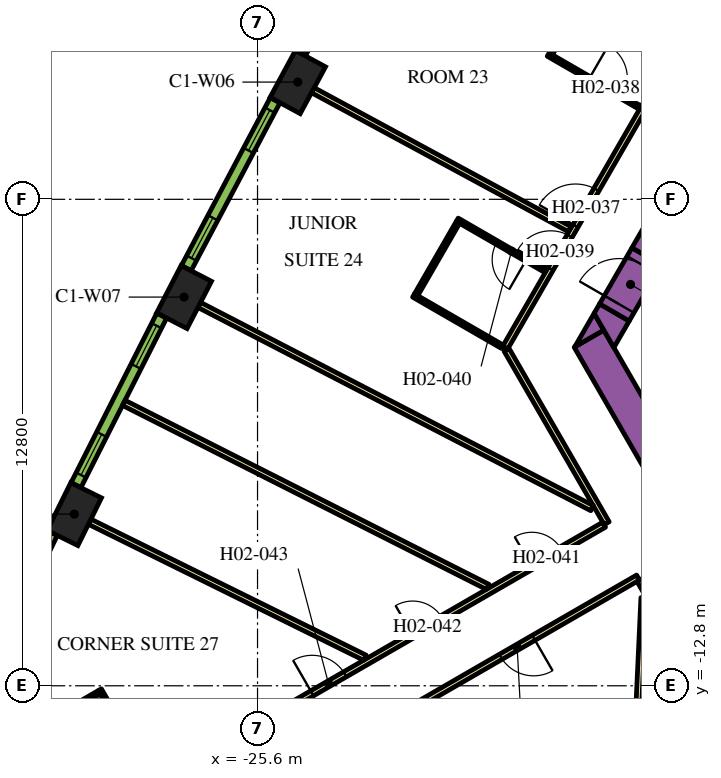
"""IFC4 building model, lengths in metres.
Left out: names, types, materials, properties, quantities, classifications, styles, units other than length and angle.
Written with IfcOpenShell. Run it as: python <this file> out.ifc"""

import sys

from ifc_helpers import new_model, si_unit, direction, frame, frame_2d, origin, origin_2d, place, context, subcontext, project, spatial, polyline, rectangle, outline, extrude, element, fill, save


model = new_model("IFC4")
c1 = context("Model", 3, precision=1e-05, world=origin(), true_north=direction((0.0, 1.0)))
c2 = subcontext(c1, "Body", "Model", "MODEL_VIEW")
j1 = project(units=[si_unit("LENGTHUNIT", "METRE"), si_unit("PLANEANGLEUNIT", "RADIAN")], contexts=[c1])
p1 = place(None, origin())
s1 = spatial("IfcSite", under=j1, at=p1, CompositionType="ELEMENT")
p2 = place(p1, origin())
s2 = spatial("IfcBuilding", under=s1, at=p2, CompositionType="ELEMENT")
p3 = place(p2, frame((0.0, 0.0, 39.3)))
s3 = spatial("IfcBuildingStorey", under=s2, at=p3, CompositionType="ELEMENT", Elevation=39.3)
for number, where, z_axis, x_axis in (
    (1, (-24.54, 3.085, 0.0), (0.0, 0.0, 1.0), (-0.476, -0.88, 0.0)),
    (2, (-27.533, -2.572, 0.0), (0.0, 0.0, 1.0), (-0.459, -0.888, 0.0)),
    (3, (-30.421, -8.284, 0.0), (0.0, 0.0, 1.0), (-0.443, -0.897, 0.0)),
):
    element("IfcColumn", number, at=place(p3, frame(where, z_axis=z_axis, x_axis=x_axis)), inside=s3, PredefinedType="COLUMN", context=c2, shape_type="SweptSolid", body=[
        extrude(rectangle(XDim=1.4, YDim=0.9, at=origin_2d()), origin(), (0.0, 0.0, 1.0), 3.9),
    ])
p4 = place(p3, frame((-15.36, -1.503, 0.0), z_axis=(0.0, 0.0, 1.0), x_axis=(0.50000389221, 0.866023156604, 0.0)))
e4 = element("IfcWall", 4, at=p4, inside=s3, PredefinedType="SOLIDWALL", context=c2, shape_type="SweptSolid", body=[
    extrude(rectangle(XDim=21.0, YDim=0.9, at=frame_2d((10.5, 0.0))), origin(), (0.0, 0.0, 1.0), 3.9),
])
p5 = place(p3, frame((-12.134, -11.883, 0.0), z_axis=(0.0, 0.0, 1.0), x_axis=(-0.500005339912, 0.866022320763, 0.0)))
e5 = element("IfcWall", 5, at=p5, inside=s3, PredefinedType="SOLIDWALL", context=c2, shape_type="SweptSolid", body=[
    extrude(rectangle(XDim=9.488, YDim=0.9, at=frame_2d((4.744, 0.0))), origin(), (0.0, 0.0, 1.0), 3.9),
])
p6 = place(p3, origin())
e6 = element("IfcWall", 6, at=p6, inside=s3, PredefinedType="SOLIDWALL", context=c2, shape_type="SweptSolid", body=[
    extrude(outline(polyline([(-16.489, -3.44), (-17.251, -3.88), (-16.743, -3.0), (-16.489, -3.44)])), origin(), (0.0, 0.0, 1.0), 3.9),
])
e7 = element("IfcWall", 7, at=p6, inside=s3, PredefinedType="SOLIDWALL", context=c2, shape_type="SweptSolid", body=[
    extrude(outline(polyline([(-15.82, -3.201), (-16.223, -3.9), (-16.743, -3.0), (-16.599, -2.751), (-15.82, -3.201)])), origin(), (0.0, 0.0, 1.0), 3.9),
])
p7 = place(p3, frame((-16.209, -2.976, 0.0), z_axis=(0.0, 0.0, 1.0), x_axis=(0.499954529098, 0.86605165483, 0.0)))
e8 = element("IfcWall", 8, at=p7, inside=s3, PredefinedType="SOLIDWALL", context=c2, shape_type="SweptSolid", body=[
    extrude(rectangle(XDim=1.7, YDim=0.9, at=frame_2d((0.85, 0.0))), origin(), (0.0, 0.0, 1.0), 3.9),
])
p8 = place(p7, frame((0.25, 0.0, 0.0)))
e9 = element("IfcOpeningElement", 9, at=p8, cuts=e8, PredefinedType="OPENING", context=c2, shape_type="SweptSolid", body=[
    extrude(rectangle(XDim=1.2, YDim=2.1, at=frame_2d((0.6, 1.05))), frame((0.0, 0.46, 0.0), z_axis=(0.0, -1.0, 0.0), x_axis=(1.0, 0.0, 0.0)), (0.0, 0.0, 1.0), 0.92),
])
p9 = place(p3, frame((-19.081, -3.9, 0.0), z_axis=(0.0, 0.0, 1.0), x_axis=(0.499998313975, 0.866026377209, 0.0)))
e10 = element("IfcWall", 10, at=p9, inside=s3, PredefinedType="PARTITIONING", context=c2, shape_type="SweptSolid", body=[
    extrude(rectangle(XDim=25.766, YDim=0.15, at=frame_2d((12.883, 0.0))), origin(), (0.0, 0.0, 1.0), 2.75),
])
p10 = place(p9, frame((16.196, 0.0, 0.0)))
e11 = element("IfcOpeningElement", 11, at=p10, cuts=e10, PredefinedType="OPENING", context=c2, shape_type="SweptSolid", body=[
    extrude(rectangle(XDim=1.0, YDim=2.1, at=frame_2d((0.5, 1.05))), frame((0.0, 0.085, 0.0), z_axis=(0.0, -1.0, 0.0), x_axis=(1.0, 0.0, 0.0)), (0.0, 0.0, 1.0), 0.17),
])
p11 = place(p9, frame((14.889, 0.0, 0.0)))
e12 = element("IfcOpeningElement", 12, at=p11, cuts=e10, PredefinedType="OPENING", context=c2, shape_type="SweptSolid", body=[
    extrude(rectangle(XDim=1.0, YDim=2.1, at=frame_2d((0.5, 1.05))), frame((0.0, 0.085, 0.0), z_axis=(0.0, -1.0, 0.0), x_axis=(1.0, 0.0, 0.0)), (0.0, 0.0, 1.0), 0.17),
])
p12 = place(p9, frame((3.698, 0.0, 0.0)))
e13 = element("IfcOpeningElement", 13, at=p12, cuts=e10, PredefinedType="OPENING", context=c2, shape_type="SweptSolid", body=[
    extrude(rectangle(XDim=1.1, YDim=2.1, at=frame_2d((0.55, 1.05))), frame((0.0, 0.085, 0.0), z_axis=(0.0, -1.0, 0.0), x_axis=(1.0, 0.0, 0.0)), (0.0, 0.0, 1.0), 0.17),
])
p13 = place(p9, frame((2.392, 0.0, 0.0)))
e14 = element("IfcOpeningElement", 14, at=p13, cuts=e10, PredefinedType="OPENING", context=c2, shape_type="SweptSolid", body=[
    extrude(rectangle(XDim=1.0, YDim=2.1, at=frame_2d((0.5, 1.05))), frame((0.0, 0.085, 0.0), z_axis=(0.0, -1.0, 0.0), x_axis=(1.0, 0.0, 0.0)), (0.0, 0.0, 1.0), 0.17),
])
p14 = place(p3, frame((-16.412, -8.523, 0.0), z_axis=(0.0, 0.0, 1.0), x_axis=(-0.500001929737, 0.866024289647, 0.0)))
e15 = element("IfcWall", 15, at=p14, inside=s3, PredefinedType="PARTITIONING", context=c2, shape_type="SweptSolid", body=[
    extrude(rectangle(XDim=5.268, YDim=0.15, at=frame_2d((2.634, 0.0))), origin(), (0.0, 0.0, 1.0), 2.75),
])
p15 = place(p3, frame((-30.463, -16.635, 0.0), z_axis=(0.0, 0.0, 1.0), x_axis=(0.866022394896, 0.500005211512, 0.0)))
e16 = element("IfcWall", 16, at=p15, inside=s3, PredefinedType="PARTITIONING", context=c2, shape_type="SweptSolid", body=[
    extrude(rectangle(XDim=16.144, YDim=0.15, at=frame_2d((8.072, 0.0))), origin(), (0.0, 0.0, 1.0), 2.75),
])
p16 = place(p15, frame((13.948, 0.0, 0.0)))
e17 = element("IfcOpeningElement", 17, at=p16, cuts=e16, PredefinedType="OPENING", context=c2, shape_type="SweptSolid", body=[
    extrude(rectangle(XDim=0.9, YDim=2.1, at=frame_2d((0.45, 1.05))), frame((0.0, 0.085, 0.0), z_axis=(0.0, -1.0, 0.0), x_axis=(1.0, 0.0, 0.0)), (0.0, 0.0, 1.0), 0.17),
])
p17 = place(p15, frame((10.329, 0.0, 0.0)))
e18 = element("IfcOpeningElement", 18, at=p17, cuts=e16, PredefinedType="OPENING", context=c2, shape_type="SweptSolid", body=[
    extrude(rectangle(XDim=0.9, YDim=2.1, at=frame_2d((0.45, 1.05))), frame((0.0, 0.085, 0.0), z_axis=(0.0, -1.0, 0.0), x_axis=(1.0, 0.0, 0.0)), (0.0, 0.0, 1.0), 0.17),
])
p18 = place(p15, frame((7.274, 0.0, 0.0)))
e19 = element("IfcOpeningElement", 19, at=p18, cuts=e16, PredefinedType="OPENING", context=c2, shape_type="SweptSolid", body=[
    extrude(rectangle(XDim=1.0, YDim=2.1, at=frame_2d((0.5, 1.05))), frame((0.0, 0.085, 0.0), z_axis=(0.0, -1.0, 0.0), x_axis=(1.0, 0.0, 0.0)), (0.0, 0.0, 1.0), 0.17),
])
p19 = place(p3, frame((-15.587, -9.952, 0.0), z_axis=(0.0, 0.0, 1.0), x_axis=(-0.866022197818, -0.500005552856, 0.0)))
e20 = element("IfcWall", 20, at=p19, inside=s3, PredefinedType="PARTITIONING", context=c2, shape_type="SweptSolid", body=[
    extrude(rectangle(XDim=16.224, YDim=0.15, at=frame_2d((8.112, 0.0))), origin(), (0.0, 0.0, 1.0), 2.75),
])
p20 = place(p19, frame((7.949, 0.0, 0.0)))
e21 = element("IfcOpeningElement", 21, at=p20, cuts=e20, PredefinedType="OPENING", context=c2, shape_type="SweptSolid", body=[
    extrude(rectangle(XDim=1.0, YDim=2.1, at=frame_2d((0.5, 1.05))), frame((0.0, 0.085, 0.0), z_axis=(0.0, -1.0, 0.0), x_axis=(1.0, 0.0, 0.0)), (0.0, 0.0, 1.0), 0.17),
])
p21 = place(p19, frame((3.172, 0.0, 0.0)))
e22 = element("IfcOpeningElement", 22, at=p21, cuts=e20, PredefinedType="OPENING", context=c2, shape_type="SweptSolid", body=[
    extrude(rectangle(XDim=1.0, YDim=2.1, at=frame_2d((0.5, 1.05))), frame((0.0, 0.085, 0.0), z_axis=(0.0, -1.0, 0.0), x_axis=(1.0, 0.0, 0.0)), (0.0, 0.0, 1.0), 0.17),
])
p22 = place(p3, frame((-12.918, -14.575, 0.0), z_axis=(0.0, 0.0, 1.0), x_axis=(-0.500009150678, 0.866020120573, 0.0)))
e23 = element("IfcWall", 23, at=p22, inside=s3, PredefinedType="PARTITIONING", context=c2, shape_type="SweptSolid", body=[
    extrude(rectangle(XDim=5.258, YDim=0.15, at=frame_2d((2.629, 0.0))), origin(), (0.0, 0.0, 1.0), 2.75),
])
p23 = place(p22, frame((1.888, 0.0, 0.0)))
e24 = element("IfcOpeningElement", 24, at=p23, cuts=e23, PredefinedType="OPENING", context=c2, shape_type="SweptSolid", body=[
    extrude(rectangle(XDim=1.0, YDim=2.1, at=frame_2d((0.5, 1.05))), frame((0.0, 0.085, 0.0), z_axis=(0.0, -1.0, 0.0), x_axis=(1.0, 0.0, 0.0)), (0.0, 0.0, 1.0), 0.17),
])
p24 = place(p3, frame((-30.018, -8.483, 0.0), z_axis=(0.0, 0.0, 1.0), x_axis=(0.896544505264, -0.44295366584, 0.0)))
e25 = element("IfcWall", 25, at=p24, inside=s3, PredefinedType="PARTITIONING", context=c2, shape_type="SweptSolid", body=[
    extrude(rectangle(XDim=8.079, YDim=0.15, at=frame_2d((4.04, 0.0))), origin(), (0.0, 0.0, 1.0), 2.75),
])
p25 = place(p3, frame((-29.12, -5.356, 0.0), z_axis=(0.0, 0.0, 1.0), x_axis=(0.892401965553, -0.451241323327, 0.0)))
e26 = element("IfcWall", 26, at=p25, inside=s3, PredefinedType="PARTITIONING", context=c2, shape_type="SweptSolid", body=[
    extrude(rectangle(XDim=10.729, YDim=0.15, at=frame_2d((5.364, 0.0))), origin(), (0.0, 0.0, 1.0), 2.75),
])
p26 = place(p3, frame((-24.145, 2.871, 0.0), z_axis=(0.0, 0.0, 1.0), x_axis=(0.879551725039, -0.475803281809, 0.0)))
e27 = element("IfcWall", 27, at=p26, inside=s3, PredefinedType="PARTITIONING", context=c2, shape_type="SweptSolid", body=[
    extrude(rectangle(XDim=7.688, YDim=0.15, at=frame_2d((3.844, 0.0))), origin(), (0.0, 0.0, 1.0), 2.75),
])
p27 = place(p3, frame((-27.134, -2.779, 0.0), z_axis=(0.0, 0.0, 1.0), x_axis=(0.8882049501, -0.459447457951, 0.0)))
e28 = element("IfcWall", 28, at=p27, inside=s3, PredefinedType="PARTITIONING", context=c2, shape_type="SweptSolid", body=[
    extrude(rectangle(XDim=11.638, YDim=0.15, at=frame_2d((5.819, 0.0))), origin(), (0.0, 0.0, 1.0), 2.75),
])
p28 = place(p3, frame((-15.973, -22.109, 0.0), z_axis=(0.0, 0.0, 1.0), x_axis=(0.046191717129, 0.998932592955, 0.0)))
e29 = element("IfcWall", 29, at=p28, inside=s3, PredefinedType="PARTITIONING", context=c2, shape_type="SweptSolid", body=[
    extrude(rectangle(XDim=11.638, YDim=0.15, at=frame_2d((5.819, 0.0))), origin(), (0.0, 0.0, 1.0), 2.75),
])
p29 = place(p3, frame((-17.951, 3.808, 0.0), z_axis=(0.0, 0.0, 1.0), x_axis=(0.866034573852, -0.49998411664, 0.0)))
e30 = element("IfcWall", 30, at=p29, inside=s3, PredefinedType="PARTITIONING", context=c2, shape_type="SweptSolid", body=[
    extrude(rectangle(XDim=2.8, YDim=0.1, at=frame_2d((1.4, 0.0))), origin(), (0.0, 0.0, 1.0), 2.75),
])
p30 = place(p29, frame((1.25, 0.0, 0.0)))
e31 = element("IfcOpeningElement", 31, at=p30, cuts=e30, PredefinedType="OPENING", context=c2, shape_type="SweptSolid", body=[
    extrude(rectangle(XDim=1.0, YDim=2.1, at=frame_2d((0.5, 1.05))), frame((0.0, 0.06, 0.0), z_axis=(0.0, -1.0, 0.0), x_axis=(1.0, 0.0, 0.0)), (0.0, 0.0, 1.0), 0.12),
])
p31 = place(p3, frame((-17.878, 3.835, 0.0), z_axis=(0.0, 0.0, 1.0), x_axis=(0.500061428766, 0.865989934965, 0.0)))
e32 = element("IfcWall", 32, at=p31, inside=s3, PredefinedType="PARTITIONING", context=c2, shape_type="SweptSolid", body=[
    extrude(rectangle(XDim=2.39, YDim=0.1, at=frame_2d((1.195, 0.0))), origin(), (0.0, 0.0, 1.0), 2.75),
])
p32 = place(p3, frame((-18.006, -1.888, 0.0), z_axis=(0.0, 0.0, 1.0), x_axis=(-0.866036505625, 0.499980770555, 0.0)))
e33 = element("IfcWall", 33, at=p32, inside=s3, PredefinedType="PARTITIONING", context=c2, shape_type="SweptSolid", body=[
    extrude(rectangle(XDim=2.7, YDim=0.1, at=frame_2d((1.35, 0.0))), origin(), (0.0, 0.0, 1.0), 2.75),
])
p33 = place(p32, frame((0.6, 0.0, 0.0)))
e34 = element("IfcOpeningElement", 34, at=p33, cuts=e33, PredefinedType="OPENING", context=c2, shape_type="SweptSolid", body=[
    extrude(rectangle(XDim=0.9, YDim=2.1, at=frame_2d((0.45, 1.05))), frame((0.0, 0.06, 0.0), z_axis=(0.0, -1.0, 0.0), x_axis=(1.0, 0.0, 0.0)), (0.0, 0.0, 1.0), 0.12),
])
p34 = place(p3, frame((-20.326, -0.606, 0.0), z_axis=(0.0, 0.0, 1.0), x_axis=(-0.499946605688, -0.86605622881, 0.0)))
e35 = element("IfcWall", 35, at=p34, inside=s3, PredefinedType="PARTITIONING", context=c2, shape_type="SweptSolid", body=[
    extrude(rectangle(XDim=2.2, YDim=0.1, at=frame_2d((1.1, 0.0))), origin(), (0.0, 0.0, 1.0), 2.75),
])
p35 = place(p3, frame((-19.156, -3.88, 0.0), z_axis=(0.0, 0.0, 1.0), x_axis=(-0.86599734893, 0.500048589285, 0.0)))
e36 = element("IfcWall", 36, at=p35, inside=s3, PredefinedType="PARTITIONING", context=c2, shape_type="SweptSolid", body=[
    extrude(rectangle(XDim=2.7, YDim=0.1, at=frame_2d((1.35, 0.0))), origin(), (0.0, 0.0, 1.0), 2.75),
])
p36 = place(p3, frame((-28.352, -15.33, 0.0), z_axis=(0.0, 0.0, 1.0), x_axis=(-0.500049511043, 0.865996816683, 0.0)))
e37 = element("IfcWall", 37, at=p36, inside=s3, PredefinedType="PARTITIONING", context=c2, shape_type="SweptSolid", body=[
    extrude(rectangle(XDim=2.8, YDim=0.1, at=frame_2d((1.4, 0.0))), origin(), (0.0, 0.0, 1.0), 2.75),
])
p37 = place(p36, frame((0.6, 0.0, 0.0)))
e38 = element("IfcOpeningElement", 38, at=p37, cuts=e37, PredefinedType="OPENING", context=c2, shape_type="SweptSolid", body=[
    extrude(rectangle(XDim=0.9, YDim=2.1, at=frame_2d((0.45, 1.05))), frame((0.0, 0.06, 0.0), z_axis=(0.0, -1.0, 0.0), x_axis=(1.0, 0.0, 0.0)), (0.0, 0.0, 1.0), 0.12),
])
p38 = place(p3, frame((-29.771, -12.973, 0.0), z_axis=(0.0, 0.0, 1.0), x_axis=(-0.865980596518, -0.500077600433, 0.0)))
e39 = element("IfcWall", 39, at=p38, inside=s3, PredefinedType="PARTITIONING", context=c2, shape_type="SweptSolid", body=[
    extrude(rectangle(XDim=2.4, YDim=0.1, at=frame_2d((1.2, 0.0))), origin(), (0.0, 0.0, 1.0), 2.75),
])
p39 = place(p3, frame((-22.05, 8.22, 0.0), z_axis=(0.0, 0.0, 1.0), x_axis=(-0.483912572871, -0.875116347589, 0.0)))
e40 = element("IfcWall", 40, at=p39, inside=s3, PredefinedType="SOLIDWALL", context=c2, shape_type="SweptSolid", body=[
    extrude(rectangle(XDim=4.998, YDim=0.29, at=frame_2d((2.499, 0.0))), origin(), (0.0, 0.0, 1.0), 3.65),
])
p40 = place(p39, frame((0.297, 0.0, 0.9)))
e41 = element("IfcOpeningElement", 41, at=p40, cuts=e40, PredefinedType="OPENING", context=c2, shape_type="SweptSolid", body=[
    extrude(rectangle(XDim=1.2, YDim=2.15, at=frame_2d((0.6, 1.075))), frame((0.0, 0.155, 0.0), z_axis=(0.0, -1.0, 0.0), x_axis=(1.0, 0.0, 0.0)), (0.0, 0.0, 1.0), 0.31),
])
p41 = place(p39, frame((3.501, 0.0, 0.9)))
e42 = element("IfcOpeningElement", 42, at=p41, cuts=e40, PredefinedType="OPENING", context=c2, shape_type="SweptSolid", body=[
    extrude(rectangle(XDim=1.2, YDim=2.15, at=frame_2d((0.6, 1.075))), frame((0.0, 0.155, 0.0), z_axis=(0.0, -1.0, 0.0), x_axis=(1.0, 0.0, 0.0)), (0.0, 0.0, 1.0), 0.31),
])
p42 = place(p3, frame((-25.138, 2.608, 0.0), z_axis=(0.0, 0.0, 1.0), x_axis=(-0.467629620899, -0.883924509026, 0.0)))
e43 = element("IfcWall", 43, at=p42, inside=s3, PredefinedType="SOLIDWALL", context=c2, shape_type="SweptSolid", body=[
    extrude(rectangle(XDim=4.998, YDim=0.29, at=frame_2d((2.499, 0.0))), origin(), (0.0, 0.0, 1.0), 3.65),
])
p43 = place(p42, frame((0.297, 0.0, 0.9)))
e44 = element("IfcOpeningElement", 44, at=p43, cuts=e43, PredefinedType="OPENING", context=c2, shape_type="SweptSolid", body=[
    extrude(rectangle(XDim=1.2, YDim=2.15, at=frame_2d((0.6, 1.075))), frame((0.0, 0.155, 0.0), z_axis=(0.0, -1.0, 0.0), x_axis=(1.0, 0.0, 0.0)), (0.0, 0.0, 1.0), 0.31),
])
p44 = place(p42, frame((3.501, 0.0, 0.9)))
e45 = element("IfcOpeningElement", 45, at=p44, cuts=e43, PredefinedType="OPENING", context=c2, shape_type="SweptSolid", body=[
    extrude(rectangle(XDim=1.2, YDim=2.15, at=frame_2d((0.6, 1.075))), frame((0.0, 0.155, 0.0), z_axis=(0.0, -1.0, 0.0), x_axis=(1.0, 0.0, 0.0)), (0.0, 0.0, 1.0), 0.31),
])
p45 = place(p3, frame((-28.122, -3.06, 0.0), z_axis=(0.0, 0.0, 1.0), x_axis=(-0.451233929645, -0.892405704115, 0.0)))
e46 = element("IfcWall", 46, at=p45, inside=s3, PredefinedType="SOLIDWALL", context=c2, shape_type="SweptSolid", body=[
    extrude(rectangle(XDim=4.998, YDim=0.29, at=frame_2d((2.499, 0.0))), origin(), (0.0, 0.0, 1.0), 3.65),
])
p46 = place(p45, frame((0.297, 0.0, 0.9)))
e47 = element("IfcOpeningElement", 47, at=p46, cuts=e46, PredefinedType="OPENING", context=c2, shape_type="SweptSolid", body=[
    extrude(rectangle(XDim=1.2, YDim=2.15, at=frame_2d((0.6, 1.075))), frame((0.0, 0.155, 0.0), z_axis=(0.0, -1.0, 0.0), x_axis=(1.0, 0.0, 0.0)), (0.0, 0.0, 1.0), 0.31),
])
p47 = place(p45, frame((3.501, 0.0, 0.9)))
e48 = element("IfcOpeningElement", 48, at=p47, cuts=e46, PredefinedType="OPENING", context=c2, shape_type="SweptSolid", body=[
    extrude(rectangle(XDim=1.2, YDim=2.15, at=frame_2d((0.6, 1.075))), frame((0.0, 0.155, 0.0), z_axis=(0.0, -1.0, 0.0), x_axis=(1.0, 0.0, 0.0)), (0.0, 0.0, 1.0), 0.31),
])
p48 = place(p3, frame((-31.0, -8.782, 0.0), z_axis=(0.0, 0.0, 1.0), x_axis=(-0.434664499056, -0.900592456808, 0.0)))
e49 = element("IfcWall", 49, at=p48, inside=s3, PredefinedType="SOLIDWALL", context=c2, shape_type="SweptSolid", body=[
    extrude(rectangle(XDim=5.006, YDim=0.29, at=frame_2d((2.503, 0.0))), origin(), (0.0, 0.0, 1.0), 3.65),
])
p49 = place(p48, frame((0.31, 0.0, 0.9)))
e50 = element("IfcOpeningElement", 50, at=p49, cuts=e49, PredefinedType="OPENING", context=c2, shape_type="SweptSolid", body=[
    extrude(rectangle(XDim=1.2, YDim=2.15, at=frame_2d((0.6, 1.075))), frame((0.0, 0.155, 0.0), z_axis=(0.0, -1.0, 0.0), x_axis=(1.0, 0.0, 0.0)), (0.0, 0.0, 1.0), 0.31),
])
p50 = place(p48, frame((3.541, 0.0, 0.9)))
e51 = element("IfcOpeningElement", 51, at=p50, cuts=e49, PredefinedType="OPENING", context=c2, shape_type="SweptSolid", body=[
    extrude(rectangle(XDim=1.2, YDim=2.15, at=frame_2d((0.6, 1.075))), frame((0.0, 0.155, 0.0), z_axis=(0.0, -1.0, 0.0), x_axis=(1.0, 0.0, 0.0)), (0.0, 0.0, 1.0), 0.31),
])
p51 = place(p8, origin())
e52 = element("IfcDoor", 52, at=p51, inside=s3, OperationType="SINGLE_SWING_LEFT", PredefinedType="DOOR", context=c2, shape_type="SweptSolid", body=[
    extrude(rectangle(XDim=1.2, YDim=2.1, at=frame_2d((0.6, 1.05))), frame((0.0, 0.025, 0.0), z_axis=(0.0, -1.0, 0.0), x_axis=(1.0, 0.0, 0.0)), (0.0, 0.0, 1.0), 0.05),
])
fill(e9, e52)
p52 = place(p21, origin())
e53 = element("IfcDoor", 53, at=p52, inside=s3, OperationType="SINGLE_SWING_RIGHT", PredefinedType="DOOR", context=c2, shape_type="SweptSolid", body=[
    extrude(rectangle(XDim=1.0, YDim=2.1, at=frame_2d((0.5, 1.05))), frame((0.0, 0.025, 0.0), z_axis=(0.0, -1.0, 0.0), x_axis=(1.0, 0.0, 0.0)), (0.0, 0.0, 1.0), 0.05),
])
fill(e22, e53)
p53 = place(p12, origin())
e54 = element("IfcDoor", 54, at=p53, inside=s3, OperationType="SINGLE_SWING_LEFT", PredefinedType="DOOR", context=c2, shape_type="SweptSolid", body=[
    extrude(rectangle(XDim=1.1, YDim=2.1, at=frame_2d((0.55, 1.05))), frame((0.0, 0.025, 0.0), z_axis=(0.0, -1.0, 0.0), x_axis=(1.0, 0.0, 0.0)), (0.0, 0.0, 1.0), 0.05),
])
fill(e13, e54)
p54 = place(p30, origin())
e55 = element("IfcDoor", 55, at=p54, inside=s3, OperationType="SINGLE_SWING_LEFT", PredefinedType="DOOR", context=c2, shape_type="SweptSolid", body=[
    extrude(rectangle(XDim=1.0, YDim=2.1, at=frame_2d((0.5, 1.05))), frame((0.0, 0.025, 0.0), z_axis=(0.0, -1.0, 0.0), x_axis=(1.0, 0.0, 0.0)), (0.0, 0.0, 1.0), 0.05),
])
fill(e31, e55)
p55 = place(p13, origin())
e56 = element("IfcDoor", 56, at=p55, inside=s3, OperationType="SINGLE_SWING_RIGHT", PredefinedType="DOOR", context=c2, shape_type="SweptSolid", body=[
    extrude(rectangle(XDim=1.0, YDim=2.1, at=frame_2d((0.5, 1.05))), frame((0.0, 0.025, 0.0), z_axis=(0.0, -1.0, 0.0), x_axis=(1.0, 0.0, 0.0)), (0.0, 0.0, 1.0), 0.05),
])
fill(e14, e56)
p56 = place(p33, origin())
e57 = element("IfcDoor", 57, at=p56, inside=s3, OperationType="SINGLE_SWING_RIGHT", PredefinedType="DOOR", context=c2, shape_type="SweptSolid", body=[
    extrude(rectangle(XDim=0.9, YDim=2.1, at=frame_2d((0.45, 1.05))), frame((0.0, 0.025, 0.0), z_axis=(0.0, -1.0, 0.0), x_axis=(1.0, 0.0, 0.0)), (0.0, 0.0, 1.0), 0.05),
])
fill(e34, e57)
p57 = place(p16, origin())
e58 = element("IfcDoor", 58, at=p57, inside=s3, OperationType="SINGLE_SWING_LEFT", PredefinedType="DOOR", context=c2, shape_type="SweptSolid", body=[
    extrude(rectangle(XDim=0.9, YDim=2.1, at=frame_2d((0.45, 1.05))), frame((0.0, 0.025, 0.0), z_axis=(0.0, -1.0, 0.0), x_axis=(1.0, 0.0, 0.0)), (0.0, 0.0, 1.0), 0.05),
])
fill(e17, e58)
p58 = place(p17, origin())
e59 = element("IfcDoor", 59, at=p58, inside=s3, OperationType="SINGLE_SWING_RIGHT", PredefinedType="DOOR", context=c2, shape_type="SweptSolid", body=[
    extrude(rectangle(XDim=0.9, YDim=2.1, at=frame_2d((0.45, 1.05))), frame((0.0, 0.025, 0.0), z_axis=(0.0, -1.0, 0.0), x_axis=(1.0, 0.0, 0.0)), (0.0, 0.0, 1.0), 0.05),
])
fill(e18, e59)
p59 = place(p18, origin())
e60 = element("IfcDoor", 60, at=p59, inside=s3, OperationType="SINGLE_SWING_RIGHT", PredefinedType="DOOR", context=c2, shape_type="SweptSolid", body=[
    extrude(rectangle(XDim=1.0, YDim=2.1, at=frame_2d((0.5, 1.05))), frame((0.0, 0.025, 0.0), z_axis=(0.0, -1.0, 0.0), x_axis=(1.0, 0.0, 0.0)), (0.0, 0.0, 1.0), 0.05),
])
fill(e19, e60)
p60 = place(p43, origin())
e61 = element("IfcWindow", 61, at=p60, inside=s3, PartitioningType="DOUBLE_PANEL_VERTICAL", PredefinedType="WINDOW", context=c2, shape_type="SweptSolid", body=[
    extrude(rectangle(XDim=1.2, YDim=2.15, at=frame_2d((0.6, 1.075))), frame((0.0, 0.015, 0.0), z_axis=(0.0, -1.0, 0.0), x_axis=(1.0, 0.0, 0.0)), (0.0, 0.0, 1.0), 0.06),
])
fill(e44, e61)
p61 = place(p44, origin())
e62 = element("IfcWindow", 62, at=p61, inside=s3, PartitioningType="DOUBLE_PANEL_VERTICAL", PredefinedType="WINDOW", context=c2, shape_type="SweptSolid", body=[
    extrude(rectangle(XDim=1.2, YDim=2.15, at=frame_2d((0.6, 1.075))), frame((0.0, 0.015, 0.0), z_axis=(0.0, -1.0, 0.0), x_axis=(1.0, 0.0, 0.0)), (0.0, 0.0, 1.0), 0.06),
])
fill(e45, e62)
p62 = place(p46, origin())
e63 = element("IfcWindow", 63, at=p62, inside=s3, PartitioningType="DOUBLE_PANEL_VERTICAL", PredefinedType="WINDOW", context=c2, shape_type="SweptSolid", body=[
    extrude(rectangle(XDim=1.2, YDim=2.15, at=frame_2d((0.6, 1.075))), frame((0.0, 0.015, 0.0), z_axis=(0.0, -1.0, 0.0), x_axis=(1.0, 0.0, 0.0)), (0.0, 0.0, 1.0), 0.06),
])
fill(e47, e63)
p63 = place(p47, origin())
e64 = element("IfcWindow", 64, at=p63, inside=s3, PartitioningType="DOUBLE_PANEL_VERTICAL", PredefinedType="WINDOW", context=c2, shape_type="SweptSolid", body=[
    extrude(rectangle(XDim=1.2, YDim=2.15, at=frame_2d((0.6, 1.075))), frame((0.0, 0.015, 0.0), z_axis=(0.0, -1.0, 0.0), x_axis=(1.0, 0.0, 0.0)), (0.0, 0.0, 1.0), 0.06),
])
fill(e48, e64)
save(model, sys.argv[1])
